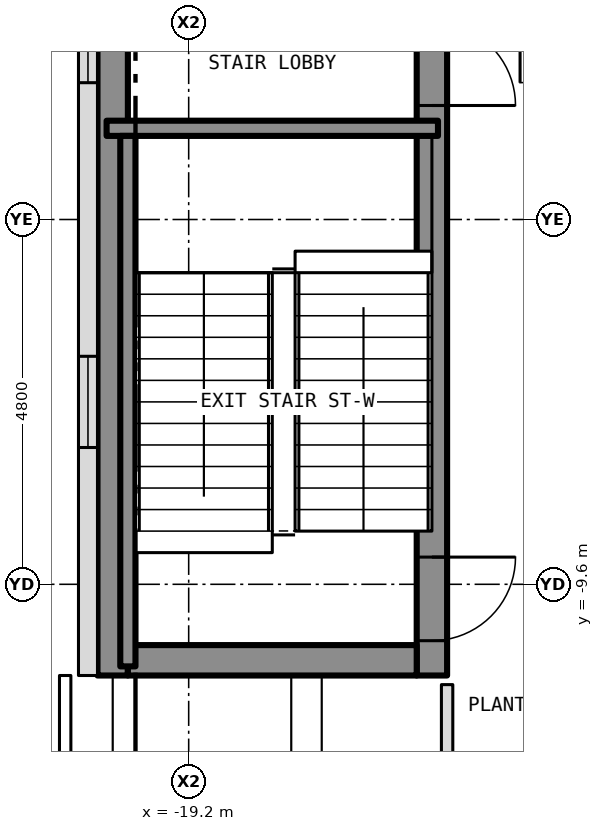
"""IFC4 building model, lengths in metres.
Left out: names, types, materials, properties, quantities, classifications, styles, units other than length and angle.
Written with IfcOpenShell. Run it as: python <this file> out.ifc"""

import sys

from ifc_helpers import new_model, si_unit, direction, frame, frame_2d, origin, place, context, subcontext, project, spatial, rectangle, extrude, element, fill, save


model = new_model("IFC4")
c1 = context("Model", 3, precision=1e-05, world=origin(), true_north=direction((0.0, 1.0)))
c2 = subcontext(c1, "Body", "Model", "MODEL_VIEW")
j1 = project(units=[si_unit("LENGTHUNIT", "METRE"), si_unit("PLANEANGLEUNIT", "RADIAN")], contexts=[c1])
p1 = place(None, origin())
s1 = spatial("IfcSite", under=j1, at=p1, CompositionType="ELEMENT")
p2 = place(p1, origin())
s2 = spatial("IfcBuilding", under=s1, at=p2, CompositionType="ELEMENT")
p3 = place(p2, frame((0.0, 0.0, 236.5)))
s3 = spatial("IfcBuildingStorey", under=s2, at=p3, CompositionType="ELEMENT", Elevation=236.5)
p4 = place(p3, frame((-16.0, -10.8, 0.0), z_axis=(0.0, 0.0, 1.0), x_axis=(0.0, 1.0, 0.0)))
e1 = element("IfcWall", 1, at=p4, inside=s3, PredefinedType="SHEAR", context=c2, shape_type="SweptSolid", body=[
    extrude(rectangle(XDim=21.6, YDim=0.4, at=frame_2d((10.8, 0.0))), origin(), (0.0, 0.0, 1.0), 3.9),
])
p5 = place(p4, frame((9.4, 0.0, 0.0)))
e2 = element("IfcOpeningElement", 2, at=p5, cuts=e1, PredefinedType="OPENING", context=c2, shape_type="SweptSolid", body=[
    extrude(rectangle(XDim=1.1, YDim=2.1, at=frame_2d((0.55, 1.05))), frame((0.0, 0.212, 0.0), z_axis=(0.0, -1.0, 0.0), x_axis=(1.0, 0.0, 0.0)), (0.0, 0.0, 1.0), 0.424),
])
p6 = place(p4, frame((11.5, 0.0, 0.0)))
e3 = element("IfcOpeningElement", 3, at=p6, cuts=e1, PredefinedType="OPENING", context=c2, shape_type="SweptSolid", body=[
    extrude(rectangle(XDim=1.1, YDim=2.1, at=frame_2d((0.55, 1.05))), frame((0.0, 0.212, 0.0), z_axis=(0.0, -1.0, 0.0), x_axis=(1.0, 0.0, 0.0)), (0.0, 0.0, 1.0), 0.424),
])
p7 = place(p4, frame((13.6, 0.0, 0.0)))
e4 = element("IfcOpeningElement", 4, at=p7, cuts=e1, PredefinedType="OPENING", context=c2, shape_type="SweptSolid", body=[
    extrude(rectangle(XDim=1.1, YDim=2.1, at=frame_2d((0.55, 1.05))), frame((0.0, 0.212, 0.0), z_axis=(0.0, -1.0, 0.0), x_axis=(1.0, 0.0, 0.0)), (0.0, 0.0, 1.0), 0.424),
])
p8 = place(p4, frame((15.7, 0.0, 0.0)))
e5 = element("IfcOpeningElement", 5, at=p8, cuts=e1, PredefinedType="OPENING", context=c2, shape_type="SweptSolid", body=[
    extrude(rectangle(XDim=1.1, YDim=2.1, at=frame_2d((0.55, 1.05))), frame((0.0, 0.212, 0.0), z_axis=(0.0, -1.0, 0.0), x_axis=(1.0, 0.0, 0.0)), (0.0, 0.0, 1.0), 0.424),
])
p9 = place(p4, frame((17.8, 0.0, 0.0)))
e6 = element("IfcOpeningElement", 6, at=p9, cuts=e1, PredefinedType="OPENING", context=c2, shape_type="SweptSolid", body=[
    extrude(rectangle(XDim=1.1, YDim=2.1, at=frame_2d((0.55, 1.05))), frame((0.0, 0.212, 0.0), z_axis=(0.0, -1.0, 0.0), x_axis=(1.0, 0.0, 0.0)), (0.0, 0.0, 1.0), 0.424),
])
p10 = place(p4, frame((0.458, 0.0, 0.0)))
e7 = element("IfcOpeningElement", 7, at=p10, cuts=e1, PredefinedType="OPENING", context=c2, shape_type="SweptSolid", body=[
    extrude(rectangle(XDim=1.1, YDim=2.1, at=frame_2d((0.55, 1.05))), frame((0.0, 0.212, 0.0), z_axis=(0.0, -1.0, 0.0), x_axis=(1.0, 0.0, 0.0)), (0.0, 0.0, 1.0), 0.424),
])
p11 = place(p4, frame((7.5, 0.0, 0.0)))
e8 = element("IfcOpeningElement", 8, at=p11, cuts=e1, PredefinedType="OPENING", context=c2, shape_type="SweptSolid", body=[
    extrude(rectangle(XDim=1.1, YDim=2.1, at=frame_2d((0.55, 1.05))), frame((0.0, 0.212, 0.0), z_axis=(0.0, -1.0, 0.0), x_axis=(1.0, 0.0, 0.0)), (0.0, 0.0, 1.0), 0.424),
])
p12 = place(p4, frame((20.0, 0.0, 0.0)))
e9 = element("IfcOpeningElement", 9, at=p12, cuts=e1, PredefinedType="OPENING", context=c2, shape_type="SweptSolid", body=[
    extrude(rectangle(XDim=0.9, YDim=2.1, at=frame_2d((0.45, 1.05))), frame((0.0, 0.212, 0.0), z_axis=(0.0, -1.0, 0.0), x_axis=(1.0, 0.0, 0.0)), (0.0, 0.0, 1.0), 0.424),
])
p13 = place(p3, frame((-20.2, -10.8, 0.0), z_axis=(0.0, 0.0, 1.0), x_axis=(0.0, 1.0, 0.0)))
e10 = element("IfcWall", 10, at=p13, inside=s3, PredefinedType="SHEAR", context=c2, shape_type="SweptSolid", body=[
    extrude(rectangle(XDim=21.6, YDim=0.4, at=frame_2d((10.8, 0.0))), origin(), (0.0, 0.0, 1.0), 3.9),
])
p14 = place(p3, frame((-20.0, -10.6, 0.0), z_axis=(0.0, 0.0, 1.0), x_axis=(1.0, 0.0, 0.0)))
e11 = element("IfcWall", 11, at=p14, inside=s3, PredefinedType="SHEAR", context=c2, shape_type="SweptSolid", body=[
    extrude(rectangle(XDim=3.8, YDim=0.4, at=frame_2d((1.9, 0.0))), origin(), (0.0, 0.0, 1.0), 3.9),
])
p15 = place(p3, frame((-20.525, 10.8, 0.0), z_axis=(0.0, 0.0, 1.0), x_axis=(0.0, -1.0, 0.0)))
e12 = element("IfcWall", 12, at=p15, inside=s3, PredefinedType="SOLIDWALL", context=c2, shape_type="SweptSolid", body=[
    extrude(rectangle(XDim=21.6, YDim=0.25, at=frame_2d((10.8, 0.0))), origin(), (0.0, 0.0, 1.0), 4.5),
])
p16 = place(p15, frame((3.0, 0.0, 2.2)))
e13 = element("IfcOpeningElement", 13, at=p16, cuts=e12, PredefinedType="OPENING", context=c2, shape_type="SweptSolid", body=[
    extrude(rectangle(XDim=1.2, YDim=0.6, at=frame_2d((0.6, 0.3))), frame((0.0, 0.137, 0.0), z_axis=(0.0, -1.0, 0.0), x_axis=(1.0, 0.0, 0.0)), (0.0, 0.0, 1.0), 0.274),
])
p17 = place(p15, frame((7.8, 0.0, 2.2)))
e14 = element("IfcOpeningElement", 14, at=p17, cuts=e12, PredefinedType="OPENING", context=c2, shape_type="SweptSolid", body=[
    extrude(rectangle(XDim=1.2, YDim=0.6, at=frame_2d((0.6, 0.3))), frame((0.0, 0.137, 0.0), z_axis=(0.0, -1.0, 0.0), x_axis=(1.0, 0.0, 0.0)), (0.0, 0.0, 1.0), 0.274),
])
p18 = place(p15, frame((12.6, 0.0, 2.2)))
e15 = element("IfcOpeningElement", 15, at=p18, cuts=e12, PredefinedType="OPENING", context=c2, shape_type="SweptSolid", body=[
    extrude(rectangle(XDim=1.2, YDim=0.6, at=frame_2d((0.6, 0.3))), frame((0.0, 0.137, 0.0), z_axis=(0.0, -1.0, 0.0), x_axis=(1.0, 0.0, 0.0)), (0.0, 0.0, 1.0), 0.274),
])
p19 = place(p15, frame((17.4, 0.0, 2.2)))
e16 = element("IfcOpeningElement", 16, at=p19, cuts=e12, PredefinedType="OPENING", context=c2, shape_type="SweptSolid", body=[
    extrude(rectangle(XDim=1.2, YDim=0.6, at=frame_2d((0.6, 0.3))), frame((0.0, 0.137, 0.0), z_axis=(0.0, -1.0, 0.0), x_axis=(1.0, 0.0, 0.0)), (0.0, 0.0, 1.0), 0.274),
])
p20 = place(p3, frame((-20.28, -3.6, 0.0), z_axis=(0.0, 0.0, 1.0), x_axis=(1.0, 0.0, 0.0)))
e17 = element("IfcWall", 17, at=p20, inside=s3, PredefinedType="SHEAR", context=c2, shape_type="SweptSolid", body=[
    extrude(rectangle(XDim=4.36, YDim=0.2, at=frame_2d((2.18, 0.0))), origin(), (0.0, 0.0, 1.0), 3.9),
])
p21 = place(p3, frame((-20.0, -10.68, 0.0), z_axis=(0.0, 0.0, 1.0), x_axis=(0.0, 1.0, 0.0)))
e18 = element("IfcWall", 18, at=p21, inside=s3, PredefinedType="SHEAR", context=c2, shape_type="SweptSolid", body=[
    extrude(rectangle(XDim=6.98, YDim=0.2, at=frame_2d((3.49, 0.0))), origin(), (0.0, 0.0, 1.0), 3.9),
])
p22 = place(p3, frame((-15.8, -12.725, 0.0), z_axis=(0.0, 0.0, 1.0), x_axis=(0.0, 1.0, 0.0)))
e19 = element("IfcWall", 19, at=p22, inside=s3, PredefinedType="PARTITIONING", context=c2, shape_type="SweptSolid", body=[
    extrude(rectangle(XDim=1.805, YDim=0.15, at=frame_2d((0.903, 0.0))), origin(), (0.0, 0.0, 1.0), 4.35),
])
p23 = place(p18, origin())
e20 = element("IfcWindow", 20, at=p23, inside=s3, PartitioningType="SINGLE_PANEL", PredefinedType="WINDOW", context=c2, shape_type="SweptSolid", body=[
    extrude(rectangle(XDim=1.2, YDim=0.6, at=frame_2d((0.6, 0.3))), frame((0.0, -0.035, 0.0), z_axis=(0.0, -1.0, 0.0), x_axis=(1.0, 0.0, 0.0)), (0.0, 0.0, 1.0), 0.06),
])
fill(e15, e20)
p24 = place(p19, origin())
e21 = element("IfcWindow", 21, at=p24, inside=s3, PartitioningType="SINGLE_PANEL", PredefinedType="WINDOW", context=c2, shape_type="SweptSolid", body=[
    extrude(rectangle(XDim=1.2, YDim=0.6, at=frame_2d((0.6, 0.3))), frame((0.0, -0.035, 0.0), z_axis=(0.0, -1.0, 0.0), x_axis=(1.0, 0.0, 0.0)), (0.0, 0.0, 1.0), 0.06),
])
fill(e16, e21)
p25 = place(p10, origin())
e22 = element("IfcDoor", 22, at=p25, inside=s3, OperationType="SINGLE_SWING_RIGHT", PredefinedType="DOOR", context=c2, shape_type="SweptSolid", body=[
    extrude(rectangle(XDim=1.1, YDim=2.1, at=frame_2d((0.55, 1.05))), frame((0.0, 0.025, 0.0), z_axis=(0.0, -1.0, 0.0), x_axis=(1.0, 0.0, 0.0)), (0.0, 0.0, 1.0), 0.05),
])
fill(e7, e22)
p26 = place(p11, origin())
e23 = element("IfcDoor", 23, at=p26, inside=s3, OperationType="SINGLE_SWING_LEFT", PredefinedType="DOOR", context=c2, shape_type="SweptSolid", body=[
    extrude(rectangle(XDim=1.1, YDim=2.1, at=frame_2d((0.55, 1.05))), frame((0.0, 0.025, 0.0), z_axis=(0.0, -1.0, 0.0), x_axis=(1.0, 0.0, 0.0)), (0.0, 0.0, 1.0), 0.05),
])
fill(e8, e23)
save(model, sys.argv[1])
